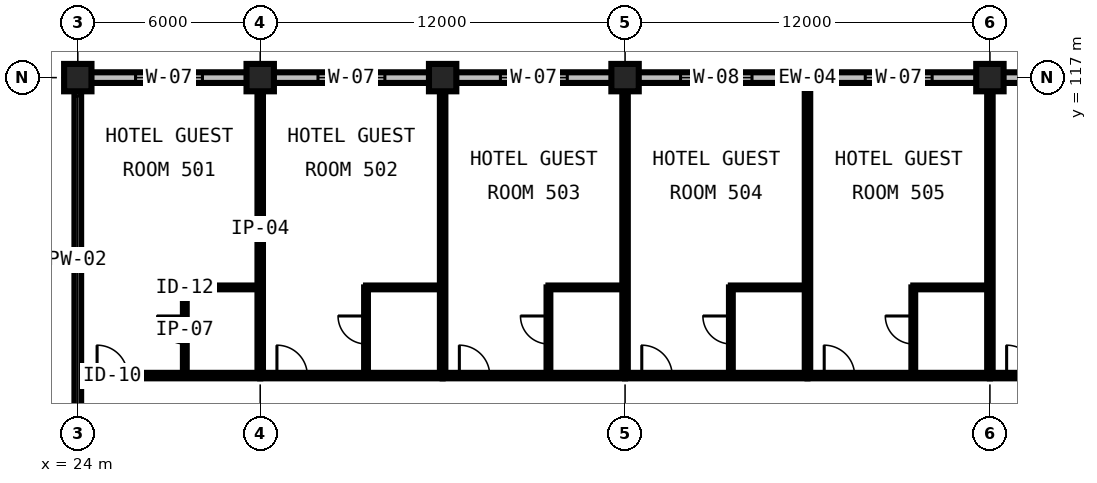
"""IFC4 building model, lengths in metres.
Left out: names, types, materials, properties, quantities, classifications, styles, units other than length and angle.
Written with IfcOpenShell. Run it as: python <this file> out.ifc"""

import sys

from ifc_helpers import new_model, si_unit, direction, frame, frame_2d, origin, origin_2d, place, context, subcontext, project, spatial, rectangle, extrude, element, fill, save


model = new_model("IFC4")
c1 = context("Model", 3, precision=1e-05, world=origin(), true_north=direction((0.0, 1.0)))
c2 = subcontext(c1, "Body", "Model", "MODEL_VIEW")
j1 = project(units=[si_unit("LENGTHUNIT", "METRE"), si_unit("PLANEANGLEUNIT", "RADIAN")], contexts=[c1])
p1 = place(None, origin())
s1 = spatial("IfcSite", under=j1, at=p1, CompositionType="ELEMENT")
p2 = place(p1, origin())
s2 = spatial("IfcBuilding", under=s1, at=p2, CompositionType="ELEMENT")
p3 = place(p2, frame((0.0, 0.0, 27.6)))
s3 = spatial("IfcBuildingStorey", under=s2, at=p3, CompositionType="ELEMENT", Elevation=27.6)
for number, where, z_axis, x_axis in (
    (1, (24.0, 117.0, 0.0), (0.0, 0.0, 1.0), (1.0, 0.0, 0.0)),
    (2, (30.0, 117.0, 0.0), (0.0, 0.0, 1.0), (1.0, 0.0, 0.0)),
    (3, (36.0, 117.0, 0.0), (0.0, 0.0, 1.0), (1.0, 0.0, 0.0)),
    (4, (42.0, 117.0, 0.0), (0.0, 0.0, 1.0), (1.0, 0.0, 0.0)),
    (5, (54.0, 117.0, 0.0), (0.0, 0.0, 1.0), (1.0, 0.0, 0.0)),
):
    element("IfcColumn", number, at=place(p3, frame(where, z_axis=z_axis, x_axis=x_axis)), inside=s3, PredefinedType="COLUMN", context=c2, shape_type="SweptSolid", body=[
        extrude(rectangle(XDim=0.9, YDim=0.9, at=origin_2d()), origin(), (0.0, 0.0, 1.0), 3.6),
    ])
p4 = place(p3, frame((30.0, 117.0, 0.0), z_axis=(0.0, 0.0, 1.0), x_axis=(-1.0, 0.0, 0.0)))
e6 = element("IfcWall", 6, at=p4, inside=s3, PredefinedType="STANDARD", context=c2, shape_type="SweptSolid", body=[
    extrude(rectangle(XDim=6.0, YDim=0.35, at=frame_2d((3.0, 0.0))), origin(), (0.0, 0.0, 1.0), 2.486),
])
p5 = place(p4, frame((1.9, 0.0, 0.75)))
e7 = element("IfcOpeningElement", 7, at=p5, cuts=e6, PredefinedType="OPENING", context=c2, shape_type="SweptSolid", body=[
    extrude(rectangle(XDim=2.2, YDim=1.6, at=frame_2d((1.1, 0.8))), frame((0.0, 0.19, 0.0), z_axis=(0.0, -1.0, 0.0), x_axis=(1.0, 0.0, 0.0)), (0.0, 0.0, 1.0), 0.38),
])
p6 = place(p3, frame((36.0, 117.0, 0.0), z_axis=(0.0, 0.0, 1.0), x_axis=(-1.0, 0.0, 0.0)))
e8 = element("IfcWall", 8, at=p6, inside=s3, PredefinedType="STANDARD", context=c2, shape_type="SweptSolid", body=[
    extrude(rectangle(XDim=6.0, YDim=0.35, at=frame_2d((3.0, 0.0))), origin(), (0.0, 0.0, 1.0), 2.486),
])
p7 = place(p6, frame((1.9, 0.0, 0.75)))
e9 = element("IfcOpeningElement", 9, at=p7, cuts=e8, PredefinedType="OPENING", context=c2, shape_type="SweptSolid", body=[
    extrude(rectangle(XDim=2.2, YDim=1.6, at=frame_2d((1.1, 0.8))), frame((0.0, 0.19, 0.0), z_axis=(0.0, -1.0, 0.0), x_axis=(1.0, 0.0, 0.0)), (0.0, 0.0, 1.0), 0.38),
])
p8 = place(p3, frame((42.0, 117.0, 0.0), z_axis=(0.0, 0.0, 1.0), x_axis=(-1.0, 0.0, 0.0)))
e10 = element("IfcWall", 10, at=p8, inside=s3, PredefinedType="STANDARD", context=c2, shape_type="SweptSolid", body=[
    extrude(rectangle(XDim=6.0, YDim=0.35, at=frame_2d((3.0, 0.0))), origin(), (0.0, 0.0, 1.0), 2.486),
])
p9 = place(p8, frame((1.9, 0.0, 0.75)))
e11 = element("IfcOpeningElement", 11, at=p9, cuts=e10, PredefinedType="OPENING", context=c2, shape_type="SweptSolid", body=[
    extrude(rectangle(XDim=2.2, YDim=1.6, at=frame_2d((1.1, 0.8))), frame((0.0, 0.19, 0.0), z_axis=(0.0, -1.0, 0.0), x_axis=(1.0, 0.0, 0.0)), (0.0, 0.0, 1.0), 0.38),
])
p10 = place(p3, frame((54.0, 117.0, 0.0), z_axis=(0.0, 0.0, 1.0), x_axis=(-1.0, 0.0, 0.0)))
e12 = element("IfcWall", 12, at=p10, inside=s3, PredefinedType="STANDARD", context=c2, shape_type="SweptSolid", body=[
    extrude(rectangle(XDim=12.0, YDim=0.35, at=frame_2d((6.0, 0.0))), origin(), (0.0, 0.0, 1.0), 2.486),
])
p11 = place(p10, frame((1.9, 0.0, 0.75)))
e13 = element("IfcOpeningElement", 13, at=p11, cuts=e12, PredefinedType="OPENING", context=c2, shape_type="SweptSolid", body=[
    extrude(rectangle(XDim=2.2, YDim=1.6, at=frame_2d((1.1, 0.8))), frame((0.0, 0.19, 0.0), z_axis=(0.0, -1.0, 0.0), x_axis=(1.0, 0.0, 0.0)), (0.0, 0.0, 1.0), 0.38),
])
p12 = place(p10, frame((7.825, 0.0, 0.75)))
e14 = element("IfcOpeningElement", 14, at=p12, cuts=e12, PredefinedType="OPENING", context=c2, shape_type="SweptSolid", body=[
    extrude(rectangle(XDim=2.35, YDim=1.6, at=frame_2d((1.175, 0.8))), frame((0.0, 0.19, 0.0), z_axis=(0.0, -1.0, 0.0), x_axis=(1.0, 0.0, 0.0)), (0.0, 0.0, 1.0), 0.38),
])
p13 = place(p3, frame((66.0, 117.0, 0.0), z_axis=(0.0, 0.0, 1.0), x_axis=(-1.0, 0.0, 0.0)))
e15 = element("IfcWall", 15, at=p13, inside=s3, PredefinedType="STANDARD", context=c2, shape_type="SweptSolid", body=[
    extrude(rectangle(XDim=12.0, YDim=0.35, at=frame_2d((6.0, 0.0))), origin(), (0.0, 0.0, 1.0), 2.486),
])
p14 = place(p13, frame((1.9, 0.0, 0.75)))
e16 = element("IfcOpeningElement", 16, at=p14, cuts=e15, PredefinedType="OPENING", context=c2, shape_type="SweptSolid", body=[
    extrude(rectangle(XDim=2.2, YDim=1.6, at=frame_2d((1.1, 0.8))), frame((0.0, 0.19, 0.0), z_axis=(0.0, -1.0, 0.0), x_axis=(1.0, 0.0, 0.0)), (0.0, 0.0, 1.0), 0.38),
])
p15 = place(p13, frame((7.825, 0.0, 0.75)))
e17 = element("IfcOpeningElement", 17, at=p15, cuts=e15, PredefinedType="OPENING", context=c2, shape_type="SweptSolid", body=[
    extrude(rectangle(XDim=2.35, YDim=1.6, at=frame_2d((1.175, 0.8))), frame((0.0, 0.19, 0.0), z_axis=(0.0, -1.0, 0.0), x_axis=(1.0, 0.0, 0.0)), (0.0, 0.0, 1.0), 0.38),
])
p16 = place(p3, frame((24.0, 117.0, 0.0), z_axis=(0.0, 0.0, 1.0), x_axis=(0.0, -1.0, 0.0)))
e18 = element("IfcWall", 18, at=p16, inside=s3, PredefinedType="PARAPET", context=c2, shape_type="SweptSolid", body=[
    extrude(rectangle(XDim=12.0, YDim=0.22, at=frame_2d((6.0, 0.0))), origin(), (0.0, 0.0, 1.0), 0.2),
])
p17 = place(p3, frame((24.085, 107.2, 0.0), z_axis=(0.0, 0.0, 1.0), x_axis=(1.0, 0.0, 0.0)))
e19 = element("IfcWall", 19, at=p17, inside=s3, PredefinedType="PARTITIONING", context=c2, shape_type="SweptSolid", body=[
    extrude(rectangle(XDim=5.915, YDim=0.18, at=frame_2d((2.957, 0.0))), origin(), (0.0, 0.0, 1.0), 3.29),
])
p18 = place(p17, frame((0.55, 0.0, 0.0)))
e20 = element("IfcOpeningElement", 20, at=p18, cuts=e19, PredefinedType="OPENING", context=c2, shape_type="SweptSolid", body=[
    extrude(rectangle(XDim=1.0, YDim=2.15, at=frame_2d((0.5, 1.075))), frame((0.0, 0.105, 0.0), z_axis=(0.0, -1.0, 0.0), x_axis=(1.0, 0.0, 0.0)), (0.0, 0.0, 1.0), 0.21),
])
p19 = place(p3, frame((30.0, 107.2, 0.0), z_axis=(0.0, 0.0, 1.0), x_axis=(0.0, 1.0, 0.0)))
e21 = element("IfcWall", 21, at=p19, inside=s3, PredefinedType="PARTITIONING", context=c2, shape_type="SweptSolid", body=[
    extrude(rectangle(XDim=9.625, YDim=0.18, at=frame_2d((4.812, 0.0))), origin(), (0.0, 0.0, 1.0), 2.59),
])
p20 = place(p3, frame((27.52, 107.29, 0.0), z_axis=(0.0, 0.0, 1.0), x_axis=(0.0, 1.0, 0.0)))
e22 = element("IfcWall", 22, at=p20, inside=s3, PredefinedType="PARTITIONING", context=c2, shape_type="SweptSolid", body=[
    extrude(rectangle(XDim=2.81, YDim=0.125, at=frame_2d((1.405, 0.0))), origin(), (0.0, 0.0, 1.0), 3.29),
])
p21 = place(p20, frame((0.95, 0.0, 0.0)))
e23 = element("IfcOpeningElement", 23, at=p21, cuts=e22, PredefinedType="OPENING", context=c2, shape_type="SweptSolid", body=[
    extrude(rectangle(XDim=0.92, YDim=2.1, at=frame_2d((0.46, 1.05))), frame((0.0, 0.077, 0.0), z_axis=(0.0, -1.0, 0.0), x_axis=(1.0, 0.0, 0.0)), (0.0, 0.0, 1.0), 0.155),
])
p22 = place(p3, frame((27.52, 110.1, 0.0), z_axis=(0.0, 0.0, 1.0), x_axis=(1.0, 0.0, 0.0)))
e24 = element("IfcWall", 24, at=p22, inside=s3, PredefinedType="PARTITIONING", context=c2, shape_type="SweptSolid", body=[
    extrude(rectangle(XDim=2.48, YDim=0.125, at=frame_2d((1.24, 0.0))), origin(), (0.0, 0.0, 1.0), 3.29),
])
p23 = place(p3, frame((30.0, 107.2, 0.0), z_axis=(0.0, 0.0, 1.0), x_axis=(1.0, 0.0, 0.0)))
e25 = element("IfcWall", 25, at=p23, inside=s3, PredefinedType="PARTITIONING", context=c2, shape_type="SweptSolid", body=[
    extrude(rectangle(XDim=6.0, YDim=0.18, at=frame_2d((3.0, 0.0))), origin(), (0.0, 0.0, 1.0), 3.29),
])
p24 = place(p23, frame((0.55, 0.0, 0.0)))
e26 = element("IfcOpeningElement", 26, at=p24, cuts=e25, PredefinedType="OPENING", context=c2, shape_type="SweptSolid", body=[
    extrude(rectangle(XDim=1.0, YDim=2.15, at=frame_2d((0.5, 1.075))), frame((0.0, 0.105, 0.0), z_axis=(0.0, -1.0, 0.0), x_axis=(1.0, 0.0, 0.0)), (0.0, 0.0, 1.0), 0.21),
])
p25 = place(p3, frame((36.0, 107.2, 0.0), z_axis=(0.0, 0.0, 1.0), x_axis=(0.0, 1.0, 0.0)))
e27 = element("IfcWall", 27, at=p25, inside=s3, PredefinedType="PARTITIONING", context=c2, shape_type="SweptSolid", body=[
    extrude(rectangle(XDim=9.625, YDim=0.18, at=frame_2d((4.812, 0.0))), origin(), (0.0, 0.0, 1.0), 2.59),
])
p26 = place(p3, frame((33.48, 107.29, 0.0), z_axis=(0.0, 0.0, 1.0), x_axis=(0.0, 1.0, 0.0)))
e28 = element("IfcWall", 28, at=p26, inside=s3, PredefinedType="PARTITIONING", context=c2, shape_type="SweptSolid", body=[
    extrude(rectangle(XDim=2.81, YDim=0.125, at=frame_2d((1.405, 0.0))), origin(), (0.0, 0.0, 1.0), 3.29),
])
p27 = place(p26, frame((0.95, 0.0, 0.0)))
e29 = element("IfcOpeningElement", 29, at=p27, cuts=e28, PredefinedType="OPENING", context=c2, shape_type="SweptSolid", body=[
    extrude(rectangle(XDim=0.92, YDim=2.1, at=frame_2d((0.46, 1.05))), frame((0.0, 0.077, 0.0), z_axis=(0.0, -1.0, 0.0), x_axis=(1.0, 0.0, 0.0)), (0.0, 0.0, 1.0), 0.155),
])
p28 = place(p3, frame((33.48, 110.1, 0.0), z_axis=(0.0, 0.0, 1.0), x_axis=(1.0, 0.0, 0.0)))
e30 = element("IfcWall", 30, at=p28, inside=s3, PredefinedType="PARTITIONING", context=c2, shape_type="SweptSolid", body=[
    extrude(rectangle(XDim=2.52, YDim=0.125, at=frame_2d((1.26, 0.0))), origin(), (0.0, 0.0, 1.0), 3.29),
])
p29 = place(p3, frame((36.0, 107.2, 0.0), z_axis=(0.0, 0.0, 1.0), x_axis=(1.0, 0.0, 0.0)))
e31 = element("IfcWall", 31, at=p29, inside=s3, PredefinedType="PARTITIONING", context=c2, shape_type="SweptSolid", body=[
    extrude(rectangle(XDim=6.0, YDim=0.18, at=frame_2d((3.0, 0.0))), origin(), (0.0, 0.0, 1.0), 3.29),
])
p30 = place(p29, frame((0.55, 0.0, 0.0)))
e32 = element("IfcOpeningElement", 32, at=p30, cuts=e31, PredefinedType="OPENING", context=c2, shape_type="SweptSolid", body=[
    extrude(rectangle(XDim=1.0, YDim=2.15, at=frame_2d((0.5, 1.075))), frame((0.0, 0.105, 0.0), z_axis=(0.0, -1.0, 0.0), x_axis=(1.0, 0.0, 0.0)), (0.0, 0.0, 1.0), 0.21),
])
p31 = place(p3, frame((42.0, 107.2, 0.0), z_axis=(0.0, 0.0, 1.0), x_axis=(0.0, 1.0, 0.0)))
e33 = element("IfcWall", 33, at=p31, inside=s3, PredefinedType="PARTITIONING", context=c2, shape_type="SweptSolid", body=[
    extrude(rectangle(XDim=9.625, YDim=0.18, at=frame_2d((4.812, 0.0))), origin(), (0.0, 0.0, 1.0), 2.59),
])
p32 = place(p3, frame((39.48, 107.29, 0.0), z_axis=(0.0, 0.0, 1.0), x_axis=(0.0, 1.0, 0.0)))
e34 = element("IfcWall", 34, at=p32, inside=s3, PredefinedType="PARTITIONING", context=c2, shape_type="SweptSolid", body=[
    extrude(rectangle(XDim=2.81, YDim=0.125, at=frame_2d((1.405, 0.0))), origin(), (0.0, 0.0, 1.0), 3.29),
])
p33 = place(p32, frame((0.95, 0.0, 0.0)))
e35 = element("IfcOpeningElement", 35, at=p33, cuts=e34, PredefinedType="OPENING", context=c2, shape_type="SweptSolid", body=[
    extrude(rectangle(XDim=0.92, YDim=2.1, at=frame_2d((0.46, 1.05))), frame((0.0, 0.077, 0.0), z_axis=(0.0, -1.0, 0.0), x_axis=(1.0, 0.0, 0.0)), (0.0, 0.0, 1.0), 0.155),
])
p34 = place(p3, frame((39.48, 110.1, 0.0), z_axis=(0.0, 0.0, 1.0), x_axis=(1.0, 0.0, 0.0)))
e36 = element("IfcWall", 36, at=p34, inside=s3, PredefinedType="PARTITIONING", context=c2, shape_type="SweptSolid", body=[
    extrude(rectangle(XDim=2.52, YDim=0.125, at=frame_2d((1.26, 0.0))), origin(), (0.0, 0.0, 1.0), 3.29),
])
p35 = place(p3, frame((42.0, 107.2, 0.0), z_axis=(0.0, 0.0, 1.0), x_axis=(1.0, 0.0, 0.0)))
e37 = element("IfcWall", 37, at=p35, inside=s3, PredefinedType="PARTITIONING", context=c2, shape_type="SweptSolid", body=[
    extrude(rectangle(XDim=6.0, YDim=0.18, at=frame_2d((3.0, 0.0))), origin(), (0.0, 0.0, 1.0), 3.29),
])
p36 = place(p35, frame((0.55, 0.0, 0.0)))
e38 = element("IfcOpeningElement", 38, at=p36, cuts=e37, PredefinedType="OPENING", context=c2, shape_type="SweptSolid", body=[
    extrude(rectangle(XDim=1.0, YDim=2.15, at=frame_2d((0.5, 1.075))), frame((0.0, 0.105, 0.0), z_axis=(0.0, -1.0, 0.0), x_axis=(1.0, 0.0, 0.0)), (0.0, 0.0, 1.0), 0.21),
])
p37 = place(p3, frame((48.0, 107.2, 0.0), z_axis=(0.0, 0.0, 1.0), x_axis=(0.0, 1.0, 0.0)))
e39 = element("IfcWall", 39, at=p37, inside=s3, PredefinedType="PARTITIONING", context=c2, shape_type="SweptSolid", body=[
    extrude(rectangle(XDim=9.625, YDim=0.18, at=frame_2d((4.812, 0.0))), origin(), (0.0, 0.0, 1.0), 3.29),
])
p38 = place(p3, frame((45.48, 107.29, 0.0), z_axis=(0.0, 0.0, 1.0), x_axis=(0.0, 1.0, 0.0)))
e40 = element("IfcWall", 40, at=p38, inside=s3, PredefinedType="PARTITIONING", context=c2, shape_type="SweptSolid", body=[
    extrude(rectangle(XDim=2.81, YDim=0.125, at=frame_2d((1.405, 0.0))), origin(), (0.0, 0.0, 1.0), 3.29),
])
p39 = place(p38, frame((0.95, 0.0, 0.0)))
e41 = element("IfcOpeningElement", 41, at=p39, cuts=e40, PredefinedType="OPENING", context=c2, shape_type="SweptSolid", body=[
    extrude(rectangle(XDim=0.92, YDim=2.1, at=frame_2d((0.46, 1.05))), frame((0.0, 0.077, 0.0), z_axis=(0.0, -1.0, 0.0), x_axis=(1.0, 0.0, 0.0)), (0.0, 0.0, 1.0), 0.155),
])
p40 = place(p3, frame((45.48, 110.1, 0.0), z_axis=(0.0, 0.0, 1.0), x_axis=(1.0, 0.0, 0.0)))
e42 = element("IfcWall", 42, at=p40, inside=s3, PredefinedType="PARTITIONING", context=c2, shape_type="SweptSolid", body=[
    extrude(rectangle(XDim=2.52, YDim=0.125, at=frame_2d((1.26, 0.0))), origin(), (0.0, 0.0, 1.0), 3.29),
])
p41 = place(p3, frame((48.0, 107.2, 0.0), z_axis=(0.0, 0.0, 1.0), x_axis=(1.0, 0.0, 0.0)))
e43 = element("IfcWall", 43, at=p41, inside=s3, PredefinedType="PARTITIONING", context=c2, shape_type="SweptSolid", body=[
    extrude(rectangle(XDim=6.0, YDim=0.18, at=frame_2d((3.0, 0.0))), origin(), (0.0, 0.0, 1.0), 3.29),
])
p42 = place(p41, frame((0.55, 0.0, 0.0)))
e44 = element("IfcOpeningElement", 44, at=p42, cuts=e43, PredefinedType="OPENING", context=c2, shape_type="SweptSolid", body=[
    extrude(rectangle(XDim=1.0, YDim=2.15, at=frame_2d((0.5, 1.075))), frame((0.0, 0.105, 0.0), z_axis=(0.0, -1.0, 0.0), x_axis=(1.0, 0.0, 0.0)), (0.0, 0.0, 1.0), 0.21),
])
p43 = place(p3, frame((54.0, 107.2, 0.0), z_axis=(0.0, 0.0, 1.0), x_axis=(0.0, 1.0, 0.0)))
e45 = element("IfcWall", 45, at=p43, inside=s3, PredefinedType="PARTITIONING", context=c2, shape_type="SweptSolid", body=[
    extrude(rectangle(XDim=9.625, YDim=0.18, at=frame_2d((4.812, 0.0))), origin(), (0.0, 0.0, 1.0), 2.59),
])
p44 = place(p3, frame((51.48, 107.29, 0.0), z_axis=(0.0, 0.0, 1.0), x_axis=(0.0, 1.0, 0.0)))
e46 = element("IfcWall", 46, at=p44, inside=s3, PredefinedType="PARTITIONING", context=c2, shape_type="SweptSolid", body=[
    extrude(rectangle(XDim=2.81, YDim=0.125, at=frame_2d((1.405, 0.0))), origin(), (0.0, 0.0, 1.0), 3.29),
])
p45 = place(p44, frame((0.95, 0.0, 0.0)))
e47 = element("IfcOpeningElement", 47, at=p45, cuts=e46, PredefinedType="OPENING", context=c2, shape_type="SweptSolid", body=[
    extrude(rectangle(XDim=0.92, YDim=2.1, at=frame_2d((0.46, 1.05))), frame((0.0, 0.077, 0.0), z_axis=(0.0, -1.0, 0.0), x_axis=(1.0, 0.0, 0.0)), (0.0, 0.0, 1.0), 0.155),
])
p46 = place(p3, frame((51.48, 110.1, 0.0), z_axis=(0.0, 0.0, 1.0), x_axis=(1.0, 0.0, 0.0)))
e48 = element("IfcWall", 48, at=p46, inside=s3, PredefinedType="PARTITIONING", context=c2, shape_type="SweptSolid", body=[
    extrude(rectangle(XDim=2.52, YDim=0.125, at=frame_2d((1.26, 0.0))), origin(), (0.0, 0.0, 1.0), 3.29),
])
p47 = place(p3, frame((54.0, 107.2, 0.0), z_axis=(0.0, 0.0, 1.0), x_axis=(1.0, 0.0, 0.0)))
e49 = element("IfcWall", 49, at=p47, inside=s3, PredefinedType="PARTITIONING", context=c2, shape_type="SweptSolid", body=[
    extrude(rectangle(XDim=6.0, YDim=0.18, at=frame_2d((3.0, 0.0))), origin(), (0.0, 0.0, 1.0), 3.29),
])
p48 = place(p47, frame((0.55, 0.0, 0.0)))
e50 = element("IfcOpeningElement", 50, at=p48, cuts=e49, PredefinedType="OPENING", context=c2, shape_type="SweptSolid", body=[
    extrude(rectangle(XDim=1.0, YDim=2.15, at=frame_2d((0.5, 1.075))), frame((0.0, 0.105, 0.0), z_axis=(0.0, -1.0, 0.0), x_axis=(1.0, 0.0, 0.0)), (0.0, 0.0, 1.0), 0.21),
])
p49 = place(p5, origin())
e51 = element("IfcWindow", 51, at=p49, inside=s3, PartitioningType="DOUBLE_PANEL_VERTICAL", PredefinedType="WINDOW", context=c2, shape_type="SweptSolid", body=[
    extrude(rectangle(XDim=2.2, YDim=1.6, at=frame_2d((1.1, 0.8))), frame((0.0, 0.03, 0.0), z_axis=(0.0, -1.0, 0.0), x_axis=(1.0, 0.0, 0.0)), (0.0, 0.0, 1.0), 0.06),
])
fill(e7, e51)
p50 = place(p7, origin())
e52 = element("IfcWindow", 52, at=p50, inside=s3, PartitioningType="DOUBLE_PANEL_VERTICAL", PredefinedType="WINDOW", context=c2, shape_type="SweptSolid", body=[
    extrude(rectangle(XDim=2.2, YDim=1.6, at=frame_2d((1.1, 0.8))), frame((0.0, 0.03, 0.0), z_axis=(0.0, -1.0, 0.0), x_axis=(1.0, 0.0, 0.0)), (0.0, 0.0, 1.0), 0.06),
])
fill(e9, e52)
p51 = place(p9, origin())
e53 = element("IfcWindow", 53, at=p51, inside=s3, PartitioningType="DOUBLE_PANEL_VERTICAL", PredefinedType="WINDOW", context=c2, shape_type="SweptSolid", body=[
    extrude(rectangle(XDim=2.2, YDim=1.6, at=frame_2d((1.1, 0.8))), frame((0.0, 0.03, 0.0), z_axis=(0.0, -1.0, 0.0), x_axis=(1.0, 0.0, 0.0)), (0.0, 0.0, 1.0), 0.06),
])
fill(e11, e53)
p52 = place(p11, origin())
e54 = element("IfcWindow", 54, at=p52, inside=s3, PartitioningType="DOUBLE_PANEL_VERTICAL", PredefinedType="WINDOW", context=c2, shape_type="SweptSolid", body=[
    extrude(rectangle(XDim=2.2, YDim=1.6, at=frame_2d((1.1, 0.8))), frame((0.0, 0.03, 0.0), z_axis=(0.0, -1.0, 0.0), x_axis=(1.0, 0.0, 0.0)), (0.0, 0.0, 1.0), 0.06),
])
fill(e13, e54)
p53 = place(p12, origin())
e55 = element("IfcWindow", 55, at=p53, inside=s3, PartitioningType="DOUBLE_PANEL_VERTICAL", PredefinedType="WINDOW", context=c2, shape_type="SweptSolid", body=[
    extrude(rectangle(XDim=2.35, YDim=1.6, at=frame_2d((1.175, 0.8))), frame((0.0, 0.03, 0.0), z_axis=(0.0, -1.0, 0.0), x_axis=(1.0, 0.0, 0.0)), (0.0, 0.0, 1.0), 0.06),
])
fill(e14, e55)
p54 = place(p18, origin())
e56 = element("IfcDoor", 56, at=p54, inside=s3, OperationType="SINGLE_SWING_LEFT", PredefinedType="DOOR", context=c2, shape_type="SweptSolid", body=[
    extrude(rectangle(XDim=1.0, YDim=2.15, at=frame_2d((0.5, 1.075))), frame((0.0, 0.025, 0.0), z_axis=(0.0, -1.0, 0.0), x_axis=(1.0, 0.0, 0.0)), (0.0, 0.0, 1.0), 0.05),
])
fill(e20, e56)
p55 = place(p21, origin())
e57 = element("IfcDoor", 57, at=p55, inside=s3, OperationType="SINGLE_SWING_RIGHT", PredefinedType="DOOR", context=c2, shape_type="SweptSolid", body=[
    extrude(rectangle(XDim=0.92, YDim=2.1, at=frame_2d((0.46, 1.05))), frame((0.0, 0.025, 0.0), z_axis=(0.0, -1.0, 0.0), x_axis=(1.0, 0.0, 0.0)), (0.0, 0.0, 1.0), 0.05),
])
fill(e23, e57)
p56 = place(p24, origin())
e58 = element("IfcDoor", 58, at=p56, inside=s3, OperationType="SINGLE_SWING_LEFT", PredefinedType="DOOR", context=c2, shape_type="SweptSolid", body=[
    extrude(rectangle(XDim=1.0, YDim=2.15, at=frame_2d((0.5, 1.075))), frame((0.0, 0.025, 0.0), z_axis=(0.0, -1.0, 0.0), x_axis=(1.0, 0.0, 0.0)), (0.0, 0.0, 1.0), 0.05),
])
fill(e26, e58)
p57 = place(p27, origin())
e59 = element("IfcDoor", 59, at=p57, inside=s3, OperationType="SINGLE_SWING_RIGHT", PredefinedType="DOOR", context=c2, shape_type="SweptSolid", body=[
    extrude(rectangle(XDim=0.92, YDim=2.1, at=frame_2d((0.46, 1.05))), frame((0.0, 0.025, 0.0), z_axis=(0.0, -1.0, 0.0), x_axis=(1.0, 0.0, 0.0)), (0.0, 0.0, 1.0), 0.05),
])
fill(e29, e59)
p58 = place(p30, origin())
e60 = element("IfcDoor", 60, at=p58, inside=s3, OperationType="SINGLE_SWING_LEFT", PredefinedType="DOOR", context=c2, shape_type="SweptSolid", body=[
    extrude(rectangle(XDim=1.0, YDim=2.15, at=frame_2d((0.5, 1.075))), frame((0.0, 0.025, 0.0), z_axis=(0.0, -1.0, 0.0), x_axis=(1.0, 0.0, 0.0)), (0.0, 0.0, 1.0), 0.05),
])
fill(e32, e60)
p59 = place(p33, origin())
e61 = element("IfcDoor", 61, at=p59, inside=s3, OperationType="SINGLE_SWING_RIGHT", PredefinedType="DOOR", context=c2, shape_type="SweptSolid", body=[
    extrude(rectangle(XDim=0.92, YDim=2.1, at=frame_2d((0.46, 1.05))), frame((0.0, 0.025, 0.0), z_axis=(0.0, -1.0, 0.0), x_axis=(1.0, 0.0, 0.0)), (0.0, 0.0, 1.0), 0.05),
])
fill(e35, e61)
p60 = place(p36, origin())
e62 = element("IfcDoor", 62, at=p60, inside=s3, OperationType="SINGLE_SWING_LEFT", PredefinedType="DOOR", context=c2, shape_type="SweptSolid", body=[
    extrude(rectangle(XDim=1.0, YDim=2.15, at=frame_2d((0.5, 1.075))), frame((0.0, 0.025, 0.0), z_axis=(0.0, -1.0, 0.0), x_axis=(1.0, 0.0, 0.0)), (0.0, 0.0, 1.0), 0.05),
])
fill(e38, e62)
p61 = place(p39, origin())
e63 = element("IfcDoor", 63, at=p61, inside=s3, OperationType="SINGLE_SWING_RIGHT", PredefinedType="DOOR", context=c2, shape_type="SweptSolid", body=[
    extrude(rectangle(XDim=0.92, YDim=2.1, at=frame_2d((0.46, 1.05))), frame((0.0, 0.025, 0.0), z_axis=(0.0, -1.0, 0.0), x_axis=(1.0, 0.0, 0.0)), (0.0, 0.0, 1.0), 0.05),
])
fill(e41, e63)
p62 = place(p42, origin())
e64 = element("IfcDoor", 64, at=p62, inside=s3, OperationType="SINGLE_SWING_LEFT", PredefinedType="DOOR", context=c2, shape_type="SweptSolid", body=[
    extrude(rectangle(XDim=1.0, YDim=2.15, at=frame_2d((0.5, 1.075))), frame((0.0, 0.025, 0.0), z_axis=(0.0, -1.0, 0.0), x_axis=(1.0, 0.0, 0.0)), (0.0, 0.0, 1.0), 0.05),
])
fill(e44, e64)
p63 = place(p45, origin())
e65 = element("IfcDoor", 65, at=p63, inside=s3, OperationType="SINGLE_SWING_RIGHT", PredefinedType="DOOR", context=c2, shape_type="SweptSolid", body=[
    extrude(rectangle(XDim=0.92, YDim=2.1, at=frame_2d((0.46, 1.05))), frame((0.0, 0.025, 0.0), z_axis=(0.0, -1.0, 0.0), x_axis=(1.0, 0.0, 0.0)), (0.0, 0.0, 1.0), 0.05),
])
fill(e47, e65)
p64 = place(p48, origin())
e66 = element("IfcDoor", 66, at=p64, inside=s3, OperationType="SINGLE_SWING_LEFT", PredefinedType="DOOR", context=c2, shape_type="SweptSolid", body=[
    extrude(rectangle(XDim=1.0, YDim=2.15, at=frame_2d((0.5, 1.075))), frame((0.0, 0.025, 0.0), z_axis=(0.0, -1.0, 0.0), x_axis=(1.0, 0.0, 0.0)), (0.0, 0.0, 1.0), 0.05),
])
fill(e50, e66)
save(model, sys.argv[1])
